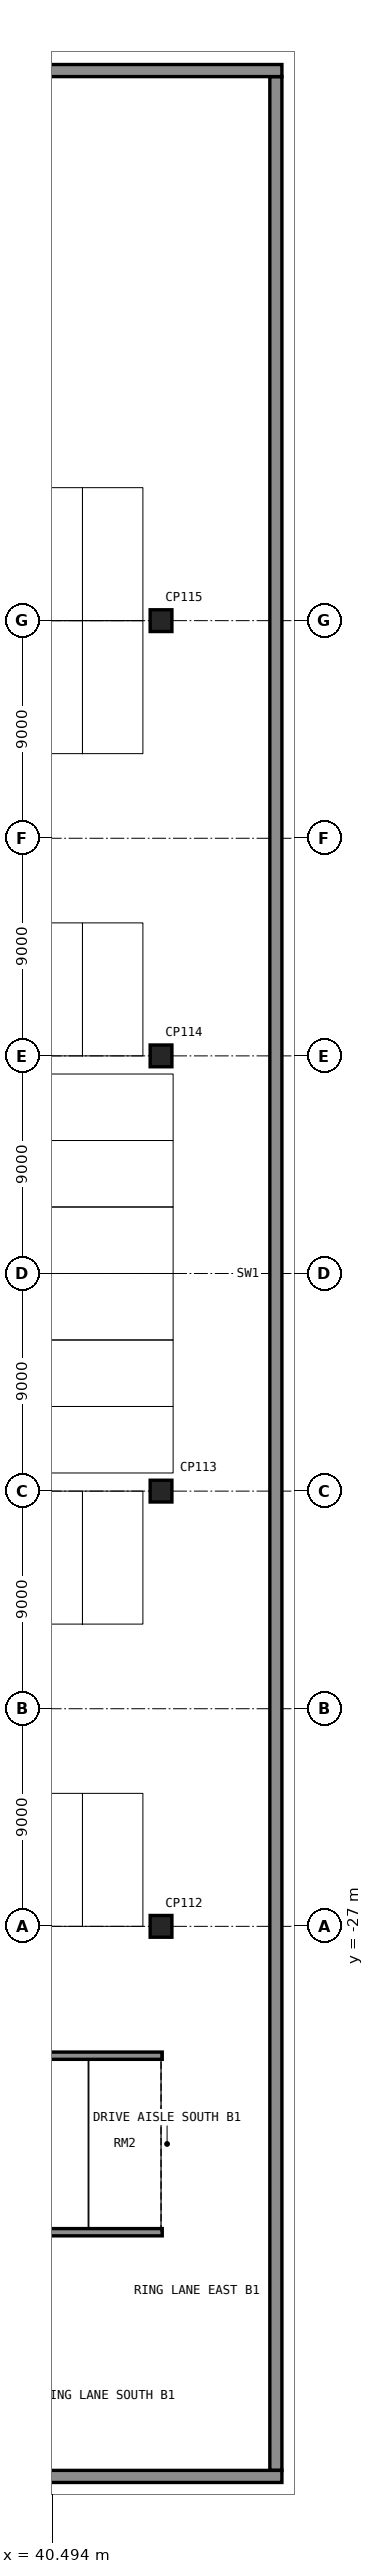
"""IFC4 building model, lengths in metres.
Left out: names, types, materials, properties, quantities, classifications, styles, units other than length and angle.
Written with IfcOpenShell. Run it as: python <this file> out.ifc"""

import sys

from ifc_helpers import new_model, si_unit, direction, frame, frame_2d, origin, origin_2d, place, context, subcontext, project, spatial, rectangle, extrude, element, save


model = new_model("IFC4")
c1 = context("Model", 3, precision=1e-05, world=origin(), true_north=direction((0.0, 1.0)))
c2 = subcontext(c1, "Body", "Model", "MODEL_VIEW")
j1 = project(units=[si_unit("LENGTHUNIT", "METRE"), si_unit("PLANEANGLEUNIT", "RADIAN")], contexts=[c1])
p1 = place(None, origin())
s1 = spatial("IfcSite", under=j1, at=p1, CompositionType="ELEMENT")
p2 = place(p1, origin())
s2 = spatial("IfcBuilding", under=s1, at=p2, CompositionType="ELEMENT")
p3 = place(p2, frame((0.0, 0.0, -4.5)))
s3 = spatial("IfcBuildingStorey", under=s2, at=p3, CompositionType="ELEMENT", Elevation=-4.5)
for number, where, z_axis, x_axis in (
    (1, (-50.0, 49.75, -0.3), (0.0, 0.0, 1.0), (1.0, 0.0, 0.0)),
    (2, (-50.0, -49.75, -0.3), (0.0, 0.0, 1.0), (1.0, 0.0, 0.0)),
):
    element("IfcWall", number, at=place(p3, frame(where, z_axis=z_axis, x_axis=x_axis)), inside=s3, PredefinedType="SOLIDWALL", context=c2, shape_type="SweptSolid", body=[
        extrude(rectangle(XDim=100.0, YDim=0.5, at=frame_2d((50.0, 0.0))), origin(), (0.0, 0.0, 1.0), 4.8),
    ])
p4 = place(p3, frame((49.75, -49.5, -0.3), z_axis=(0.0, 0.0, 1.0), x_axis=(0.0, 1.0, 0.0)))
e3 = element("IfcWall", 3, at=p4, inside=s3, PredefinedType="SOLIDWALL", context=c2, shape_type="SweptSolid", body=[
    extrude(rectangle(XDim=99.0, YDim=0.5, at=frame_2d((49.5, 0.0))), origin(), (0.0, 0.0, 1.0), 4.8),
])
for number, where, z_axis, x_axis in (
    (4, (45.0, -27.0, -0.3), (0.0, 0.0, 1.0), (1.0, 0.0, 0.0)),
    (5, (45.0, -9.0, -0.3), (0.0, 0.0, 1.0), (1.0, 0.0, 0.0)),
    (6, (45.0, 9.0, -0.3), (0.0, 0.0, 1.0), (1.0, 0.0, 0.0)),
    (7, (45.0, 27.0, -0.3), (0.0, 0.0, 1.0), (1.0, 0.0, 0.0)),
):
    element("IfcColumn", number, at=place(p3, frame(where, z_axis=z_axis, x_axis=x_axis)), inside=s3, PredefinedType="COLUMN", context=c2, shape_type="SweptSolid", body=[
        extrude(rectangle(XDim=0.9, YDim=0.9, at=origin_2d()), origin(), (0.0, 0.0, 1.0), 4.4),
    ])
for number, where, z_axis, x_axis in (
    (8, (10.5, -39.65, 0.0), (0.0, 0.0, 1.0), (1.0, 0.0, 0.0)),
    (9, (10.5, -32.35, 0.0), (0.0, 0.0, 1.0), (1.0, 0.0, 0.0)),
):
    element("IfcWall", number, at=place(p3, frame(where, z_axis=z_axis, x_axis=x_axis)), inside=s3, PredefinedType="SOLIDWALL", context=c2, shape_type="SweptSolid", body=[
        extrude(rectangle(XDim=34.55, YDim=0.3, at=frame_2d((17.275, 0.0))), origin(), (0.0, 0.0, 1.0), 4.5),
    ])
save(model, sys.argv[1])
